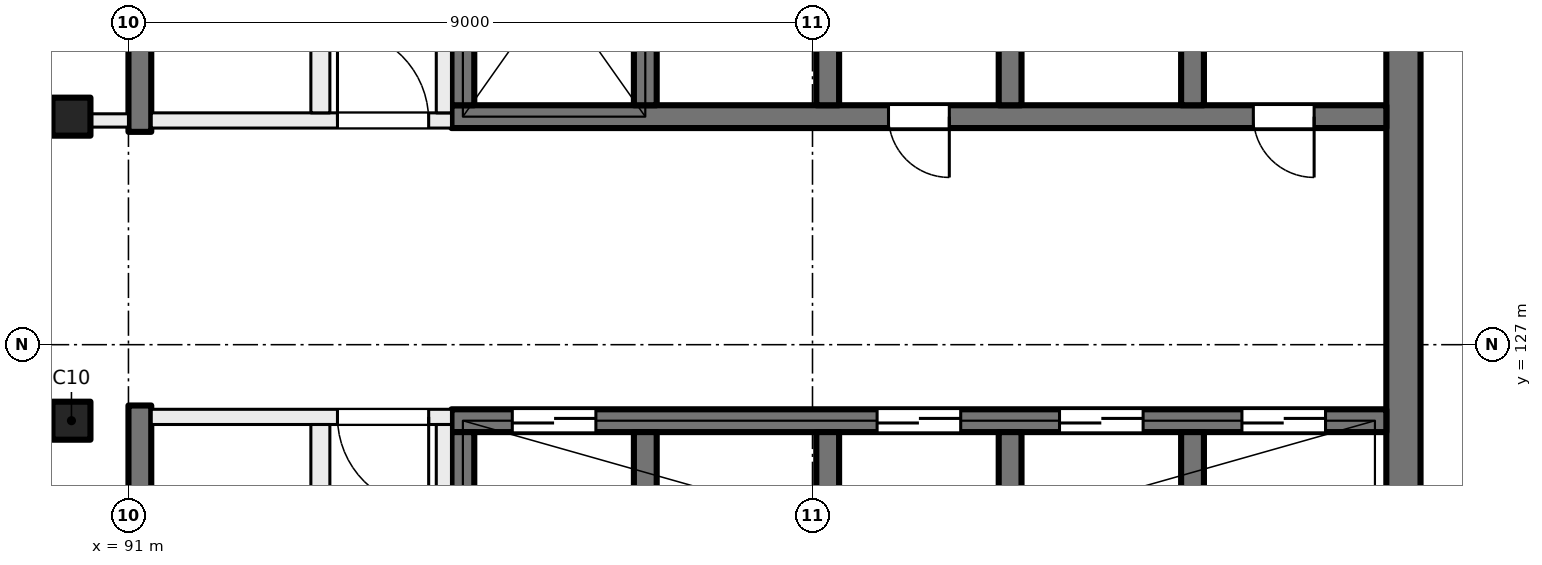
"""IFC4 building model, lengths in metres.
Left out: names, types, materials, properties, quantities, classifications, styles, units other than length and angle.
Written with IfcOpenShell. Run it as: python <this file> out.ifc"""

import sys

from ifc_helpers import new_model, si_unit, direction, frame, frame_2d, origin, origin_2d, place, context, subcontext, project, spatial, rectangle, extrude, element, fill, save


model = new_model("IFC4")
c1 = context("Model", 3, precision=1e-05, world=origin(), true_north=direction((0.0, 1.0)))
c2 = subcontext(c1, "Body", "Model", "MODEL_VIEW")
j1 = project(units=[si_unit("LENGTHUNIT", "METRE"), si_unit("PLANEANGLEUNIT", "RADIAN")], contexts=[c1])
p1 = place(None, origin())
s1 = spatial("IfcSite", under=j1, at=p1, CompositionType="ELEMENT")
p2 = place(p1, origin())
s2 = spatial("IfcBuilding", under=s1, at=p2, CompositionType="ELEMENT")
p3 = place(p2, frame((0.0, 0.0, 253.5)))
s3 = spatial("IfcBuildingStorey", under=s2, at=p3, CompositionType="ELEMENT", Elevation=253.5)
for number, where, z_axis, x_axis in (
    (1, (90.25, 130.0, 0.0), (0.0, 0.0, 1.0), (1.0, 0.0, 0.0)),
    (2, (90.25, 126.0, 0.0), (0.0, 0.0, 1.0), (1.0, 0.0, 0.0)),
):
    element("IfcColumn", number, at=place(p3, frame(where, z_axis=z_axis, x_axis=x_axis)), inside=s3, PredefinedType="COLUMN", context=c2, shape_type="SweptSolid", body=[
        extrude(rectangle(XDim=0.5, YDim=0.5, at=origin_2d()), origin(), (0.0, 0.0, 1.0), 4.0),
    ])
p4 = place(p3, frame((107.775, 135.2, 0.0), z_axis=(0.0, 0.0, 1.0), x_axis=(0.0, -1.0, 0.0)))
e3 = element("IfcWall", 3, at=p4, inside=s3, PredefinedType="SHEAR", context=c2, shape_type="SweptSolid", body=[
    extrude(rectangle(XDim=14.4, YDim=0.45, at=frame_2d((7.2, 0.0))), origin(), (0.0, 0.0, 1.0), 4.0),
])
p5 = place(p3, frame((107.55, 130.0, 0.0), z_axis=(0.0, 0.0, 1.0), x_axis=(-1.0, 0.0, 0.0)))
e4 = element("IfcWall", 4, at=p5, inside=s3, PredefinedType="SHEAR", context=c2, shape_type="SweptSolid", body=[
    extrude(rectangle(XDim=12.3, YDim=0.3, at=frame_2d((6.15, 0.0))), origin(), (0.0, 0.0, 1.0), 4.0),
])
p6 = place(p5, frame((0.95, 0.0, 0.0)))
e5 = element("IfcOpeningElement", 5, at=p6, cuts=e4, PredefinedType="OPENING", context=c2, shape_type="SweptSolid", body=[
    extrude(rectangle(XDim=0.8, YDim=2.1, at=frame_2d((0.4, 1.05))), frame((0.0, 0.16, 0.0), z_axis=(0.0, -1.0, 0.0), x_axis=(1.0, 0.0, 0.0)), (0.0, 0.0, 1.0), 0.32),
])
p7 = place(p5, frame((5.75, 0.0, 0.0)))
e6 = element("IfcOpeningElement", 6, at=p7, cuts=e4, PredefinedType="OPENING", context=c2, shape_type="SweptSolid", body=[
    extrude(rectangle(XDim=0.8, YDim=2.1, at=frame_2d((0.4, 1.05))), frame((0.0, 0.16, 0.0), z_axis=(0.0, -1.0, 0.0), x_axis=(1.0, 0.0, 0.0)), (0.0, 0.0, 1.0), 0.32),
])
for number, where, z_axis, x_axis in (
    (7, (105.0, 133.25, 0.0), (0.0, 0.0, 1.0), (0.0, -1.0, 0.0)),
    (8, (102.6, 133.25, 0.0), (0.0, 0.0, 1.0), (0.0, -1.0, 0.0)),
    (9, (100.2, 133.25, 0.0), (0.0, 0.0, 1.0), (0.0, -1.0, 0.0)),
    (10, (97.8, 133.25, 0.0), (0.0, 0.0, 1.0), (0.0, -1.0, 0.0)),
    (11, (95.4, 133.25, 0.0), (0.0, 0.0, 1.0), (0.0, -1.0, 0.0)),
):
    element("IfcWall", number, at=place(p3, frame(where, z_axis=z_axis, x_axis=x_axis)), inside=s3, PredefinedType="SHEAR", context=c2, shape_type="SweptSolid", body=[
        extrude(rectangle(XDim=3.1, YDim=0.3, at=frame_2d((1.55, 0.0))), origin(), (0.0, 0.0, 1.0), 4.0),
    ])
p8 = place(p3, frame((107.55, 126.0, 0.0), z_axis=(0.0, 0.0, 1.0), x_axis=(-1.0, 0.0, 0.0)))
e12 = element("IfcWall", 12, at=p8, inside=s3, PredefinedType="SHEAR", context=c2, shape_type="SweptSolid", body=[
    extrude(rectangle(XDim=12.3, YDim=0.3, at=frame_2d((6.15, 0.0))), origin(), (0.0, 0.0, 1.0), 4.0),
])
p9 = place(p8, frame((0.8, 0.0, 0.0)))
e13 = element("IfcOpeningElement", 13, at=p9, cuts=e12, PredefinedType="OPENING", context=c2, shape_type="SweptSolid", body=[
    extrude(rectangle(XDim=1.1, YDim=2.1, at=frame_2d((0.55, 1.05))), frame((0.0, 0.16, 0.0), z_axis=(0.0, -1.0, 0.0), x_axis=(1.0, 0.0, 0.0)), (0.0, 0.0, 1.0), 0.32),
])
p10 = place(p8, frame((3.2, 0.0, 0.0)))
e14 = element("IfcOpeningElement", 14, at=p10, cuts=e12, PredefinedType="OPENING", context=c2, shape_type="SweptSolid", body=[
    extrude(rectangle(XDim=1.1, YDim=2.1, at=frame_2d((0.55, 1.05))), frame((0.0, 0.16, 0.0), z_axis=(0.0, -1.0, 0.0), x_axis=(1.0, 0.0, 0.0)), (0.0, 0.0, 1.0), 0.32),
])
p11 = place(p8, frame((5.6, 0.0, 0.0)))
e15 = element("IfcOpeningElement", 15, at=p11, cuts=e12, PredefinedType="OPENING", context=c2, shape_type="SweptSolid", body=[
    extrude(rectangle(XDim=1.1, YDim=2.1, at=frame_2d((0.55, 1.05))), frame((0.0, 0.16, 0.0), z_axis=(0.0, -1.0, 0.0), x_axis=(1.0, 0.0, 0.0)), (0.0, 0.0, 1.0), 0.32),
])
p12 = place(p8, frame((10.4, 0.0, 0.0)))
e16 = element("IfcOpeningElement", 16, at=p12, cuts=e12, PredefinedType="OPENING", context=c2, shape_type="SweptSolid", body=[
    extrude(rectangle(XDim=1.1, YDim=2.1, at=frame_2d((0.55, 1.05))), frame((0.0, 0.16, 0.0), z_axis=(0.0, -1.0, 0.0), x_axis=(1.0, 0.0, 0.0)), (0.0, 0.0, 1.0), 0.32),
])
for number, where, z_axis, x_axis in (
    (17, (105.0, 125.85, 0.0), (0.0, 0.0, 1.0), (0.0, -1.0, 0.0)),
    (18, (102.6, 125.85, 0.0), (0.0, 0.0, 1.0), (0.0, -1.0, 0.0)),
    (19, (100.2, 125.85, 0.0), (0.0, 0.0, 1.0), (0.0, -1.0, 0.0)),
    (20, (97.8, 125.85, 0.0), (0.0, 0.0, 1.0), (0.0, -1.0, 0.0)),
    (21, (95.4, 125.85, 0.0), (0.0, 0.0, 1.0), (0.0, -1.0, 0.0)),
):
    element("IfcWall", number, at=place(p3, frame(where, z_axis=z_axis, x_axis=x_axis)), inside=s3, PredefinedType="SHEAR", context=c2, shape_type="SweptSolid", body=[
        extrude(rectangle(XDim=3.1, YDim=0.3, at=frame_2d((1.55, 0.0))), origin(), (0.0, 0.0, 1.0), 4.0),
    ])
for number, where, z_axis, x_axis in (
    (22, (91.15, 138.55, 0.0), (0.0, 0.0, 1.0), (0.0, -1.0, 0.0)),
    (23, (91.15, 126.2, 0.0), (0.0, 0.0, 1.0), (0.0, -1.0, 0.0)),
):
    element("IfcWall", number, at=place(p3, frame(where, z_axis=z_axis, x_axis=x_axis)), inside=s3, PredefinedType="SHEAR", context=c2, shape_type="SweptSolid", body=[
        extrude(rectangle(XDim=8.75, YDim=0.3, at=frame_2d((4.375, 0.0))), origin(), (0.0, 0.0, 1.0), 4.0),
    ])
p13 = place(p3, frame((95.25, 126.05, 0.0), z_axis=(0.0, 0.0, 1.0), x_axis=(-1.0, 0.0, 0.0)))
e24 = element("IfcWall", 24, at=p13, inside=s3, PredefinedType="PARTITIONING", context=c2, shape_type="SweptSolid", body=[
    extrude(rectangle(XDim=3.95, YDim=0.2, at=frame_2d((1.975, 0.0))), origin(), (0.0, 0.0, 1.0), 3.625),
])
p14 = place(p13, frame((0.3, 0.0, 0.0)))
e25 = element("IfcOpeningElement", 25, at=p14, cuts=e24, PredefinedType="OPENING", context=c2, shape_type="SweptSolid", body=[
    extrude(rectangle(XDim=1.2, YDim=2.1, at=frame_2d((0.6, 1.05))), frame((0.0, 0.11, 0.0), z_axis=(0.0, -1.0, 0.0), x_axis=(1.0, 0.0, 0.0)), (0.0, 0.0, 1.0), 0.22),
])
p15 = place(p3, frame((95.15, 117.45, 0.0), z_axis=(0.0, 0.0, 1.0), x_axis=(0.0, 1.0, 0.0)))
e26 = element("IfcWall", 26, at=p15, inside=s3, PredefinedType="PARTITIONING", context=c2, shape_type="SweptSolid", body=[
    extrude(rectangle(XDim=8.5, YDim=0.2, at=frame_2d((4.25, 0.0))), origin(), (0.0, 0.0, 1.0), 3.625),
])
p16 = place(p15, frame((1.75, 0.0, 0.0)))
e27 = element("IfcOpeningElement", 27, at=p16, cuts=e26, PredefinedType="OPENING", context=c2, shape_type="SweptSolid", body=[
    extrude(rectangle(XDim=1.5, YDim=2.1, at=frame_2d((0.75, 1.05))), frame((0.0, 0.11, 0.0), z_axis=(0.0, -1.0, 0.0), x_axis=(1.0, 0.0, 0.0)), (0.0, 0.0, 1.0), 0.22),
])
p17 = place(p3, frame((93.525, 117.45, 0.0), z_axis=(0.0, 0.0, 1.0), x_axis=(0.0, 1.0, 0.0)))
e28 = element("IfcWall", 28, at=p17, inside=s3, PredefinedType="PARTITIONING", context=c2, shape_type="SweptSolid", body=[
    extrude(rectangle(XDim=8.5, YDim=0.25, at=frame_2d((4.25, 0.0))), origin(), (0.0, 0.0, 1.0), 3.625),
])
p18 = place(p17, frame((3.85, 0.0, 0.0)))
e29 = element("IfcOpeningElement", 29, at=p18, cuts=e28, PredefinedType="OPENING", context=c2, shape_type="SweptSolid", body=[
    extrude(rectangle(XDim=0.8, YDim=2.1, at=frame_2d((0.4, 1.05))), frame((0.0, 0.135, 0.0), z_axis=(0.0, -1.0, 0.0), x_axis=(1.0, 0.0, 0.0)), (0.0, 0.0, 1.0), 0.27),
])
p19 = place(p3, frame((91.3, 129.95, 0.0), z_axis=(0.0, 0.0, 1.0), x_axis=(1.0, 0.0, 0.0)))
e30 = element("IfcWall", 30, at=p19, inside=s3, PredefinedType="PARTITIONING", context=c2, shape_type="SweptSolid", body=[
    extrude(rectangle(XDim=3.95, YDim=0.2, at=frame_2d((1.975, 0.0))), origin(), (0.0, 0.0, 1.0), 3.625),
])
p20 = place(p19, frame((2.45, 0.0, 0.0)))
e31 = element("IfcOpeningElement", 31, at=p20, cuts=e30, PredefinedType="OPENING", context=c2, shape_type="SweptSolid", body=[
    extrude(rectangle(XDim=1.2, YDim=2.1, at=frame_2d((0.6, 1.05))), frame((0.0, 0.11, 0.0), z_axis=(0.0, -1.0, 0.0), x_axis=(1.0, 0.0, 0.0)), (0.0, 0.0, 1.0), 0.22),
])
p21 = place(p3, frame((95.15, 130.05, 0.0), z_axis=(0.0, 0.0, 1.0), x_axis=(0.0, 1.0, 0.0)))
e32 = element("IfcWall", 32, at=p21, inside=s3, PredefinedType="PARTITIONING", context=c2, shape_type="SweptSolid", body=[
    extrude(rectangle(XDim=8.5, YDim=0.2, at=frame_2d((4.25, 0.0))), origin(), (0.0, 0.0, 1.0), 3.625),
])
p22 = place(p21, frame((5.25, 0.0, 0.0)))
e33 = element("IfcOpeningElement", 33, at=p22, cuts=e32, PredefinedType="OPENING", context=c2, shape_type="SweptSolid", body=[
    extrude(rectangle(XDim=1.5, YDim=2.1, at=frame_2d((0.75, 1.05))), frame((0.0, 0.11, 0.0), z_axis=(0.0, -1.0, 0.0), x_axis=(1.0, 0.0, 0.0)), (0.0, 0.0, 1.0), 0.22),
])
p23 = place(p3, frame((93.525, 130.05, 0.0), z_axis=(0.0, 0.0, 1.0), x_axis=(0.0, 1.0, 0.0)))
e34 = element("IfcWall", 34, at=p23, inside=s3, PredefinedType="PARTITIONING", context=c2, shape_type="SweptSolid", body=[
    extrude(rectangle(XDim=8.5, YDim=0.25, at=frame_2d((4.25, 0.0))), origin(), (0.0, 0.0, 1.0), 3.625),
])
p24 = place(p23, frame((0.99, 0.0, 0.0)))
e35 = element("IfcOpeningElement", 35, at=p24, cuts=e34, PredefinedType="OPENING", context=c2, shape_type="SweptSolid", body=[
    extrude(rectangle(XDim=0.8, YDim=2.1, at=frame_2d((0.4, 1.05))), frame((0.0, 0.135, 0.0), z_axis=(0.0, -1.0, 0.0), x_axis=(1.0, 0.0, 0.0)), (0.0, 0.0, 1.0), 0.27),
])
p25 = place(p23, frame((5.29, 0.0, 0.0)))
e36 = element("IfcOpeningElement", 36, at=p25, cuts=e34, PredefinedType="OPENING", context=c2, shape_type="SweptSolid", body=[
    extrude(rectangle(XDim=0.8, YDim=2.1, at=frame_2d((0.4, 1.05))), frame((0.0, 0.135, 0.0), z_axis=(0.0, -1.0, 0.0), x_axis=(1.0, 0.0, 0.0)), (0.0, 0.0, 1.0), 0.27),
])
p26 = place(p3, frame((85.838, 129.95, 0.0), z_axis=(0.0, 0.0, 1.0), x_axis=(1.0, 0.0, 0.0)))
e37 = element("IfcWall", 37, at=p26, inside=s3, PredefinedType="PARTITIONING", context=c2, shape_type="SweptSolid", body=[
    extrude(rectangle(XDim=5.162, YDim=0.175, at=frame_2d((2.581, 0.0))), origin(), (0.0, 0.0, 1.0), 3.625),
])
p27 = place(p26, frame((1.971, 0.0, 0.0)))
e38 = element("IfcOpeningElement", 38, at=p27, cuts=e37, PredefinedType="OPENING", context=c2, shape_type="SweptSolid", body=[
    extrude(rectangle(XDim=1.2, YDim=2.1, at=frame_2d((0.6, 1.05))), frame((0.0, 0.097, 0.0), z_axis=(0.0, -1.0, 0.0), x_axis=(1.0, 0.0, 0.0)), (0.0, 0.0, 1.0), 0.195),
])
p28 = place(p9, origin())
e39 = element("IfcDoor", 39, at=p28, inside=s3, OperationType="DOUBLE_DOOR_SLIDING", PredefinedType="DOOR", context=c2, shape_type="SweptSolid", body=[
    extrude(rectangle(XDim=1.1, YDim=2.1, at=frame_2d((0.55, 1.05))), frame((0.0, 0.025, 0.0), z_axis=(0.0, -1.0, 0.0), x_axis=(1.0, 0.0, 0.0)), (0.0, 0.0, 1.0), 0.05),
])
fill(e13, e39)
p29 = place(p10, origin())
e40 = element("IfcDoor", 40, at=p29, inside=s3, OperationType="DOUBLE_DOOR_SLIDING", PredefinedType="DOOR", context=c2, shape_type="SweptSolid", body=[
    extrude(rectangle(XDim=1.1, YDim=2.1, at=frame_2d((0.55, 1.05))), frame((0.0, 0.025, 0.0), z_axis=(0.0, -1.0, 0.0), x_axis=(1.0, 0.0, 0.0)), (0.0, 0.0, 1.0), 0.05),
])
fill(e14, e40)
p30 = place(p11, origin())
e41 = element("IfcDoor", 41, at=p30, inside=s3, OperationType="DOUBLE_DOOR_SLIDING", PredefinedType="DOOR", context=c2, shape_type="SweptSolid", body=[
    extrude(rectangle(XDim=1.1, YDim=2.1, at=frame_2d((0.55, 1.05))), frame((0.0, 0.025, 0.0), z_axis=(0.0, -1.0, 0.0), x_axis=(1.0, 0.0, 0.0)), (0.0, 0.0, 1.0), 0.05),
])
fill(e15, e41)
p31 = place(p12, origin())
e42 = element("IfcDoor", 42, at=p31, inside=s3, OperationType="DOUBLE_DOOR_SLIDING", PredefinedType="DOOR", context=c2, shape_type="SweptSolid", body=[
    extrude(rectangle(XDim=1.1, YDim=2.1, at=frame_2d((0.55, 1.05))), frame((0.0, 0.025, 0.0), z_axis=(0.0, -1.0, 0.0), x_axis=(1.0, 0.0, 0.0)), (0.0, 0.0, 1.0), 0.05),
])
fill(e16, e42)
p32 = place(p6, origin())
e43 = element("IfcDoor", 43, at=p32, inside=s3, OperationType="SINGLE_SWING_LEFT", PredefinedType="DOOR", context=c2, shape_type="SweptSolid", body=[
    extrude(rectangle(XDim=0.8, YDim=2.1, at=frame_2d((0.4, 1.05))), frame((0.0, 0.025, 0.0), z_axis=(0.0, -1.0, 0.0), x_axis=(1.0, 0.0, 0.0)), (0.0, 0.0, 1.0), 0.05),
])
fill(e5, e43)
p33 = place(p7, origin())
e44 = element("IfcDoor", 44, at=p33, inside=s3, OperationType="SINGLE_SWING_RIGHT", PredefinedType="DOOR", context=c2, shape_type="SweptSolid", body=[
    extrude(rectangle(XDim=0.8, YDim=2.1, at=frame_2d((0.4, 1.05))), frame((0.0, 0.025, 0.0), z_axis=(0.0, -1.0, 0.0), x_axis=(1.0, 0.0, 0.0)), (0.0, 0.0, 1.0), 0.05),
])
fill(e6, e44)
p34 = place(p14, origin())
e45 = element("IfcDoor", 45, at=p34, inside=s3, OperationType="DOUBLE_DOOR_SINGLE_SWING", PredefinedType="DOOR", context=c2, shape_type="SweptSolid", body=[
    extrude(rectangle(XDim=1.2, YDim=2.1, at=frame_2d((0.6, 1.05))), frame((0.0, 0.025, 0.0), z_axis=(0.0, -1.0, 0.0), x_axis=(1.0, 0.0, 0.0)), (0.0, 0.0, 1.0), 0.05),
])
fill(e25, e45)
p35 = place(p20, origin())
e46 = element("IfcDoor", 46, at=p35, inside=s3, OperationType="DOUBLE_DOOR_SINGLE_SWING", PredefinedType="DOOR", context=c2, shape_type="SweptSolid", body=[
    extrude(rectangle(XDim=1.2, YDim=2.1, at=frame_2d((0.6, 1.05))), frame((0.0, 0.025, 0.0), z_axis=(0.0, -1.0, 0.0), x_axis=(1.0, 0.0, 0.0)), (0.0, 0.0, 1.0), 0.05),
])
fill(e31, e46)
save(model, sys.argv[1])
